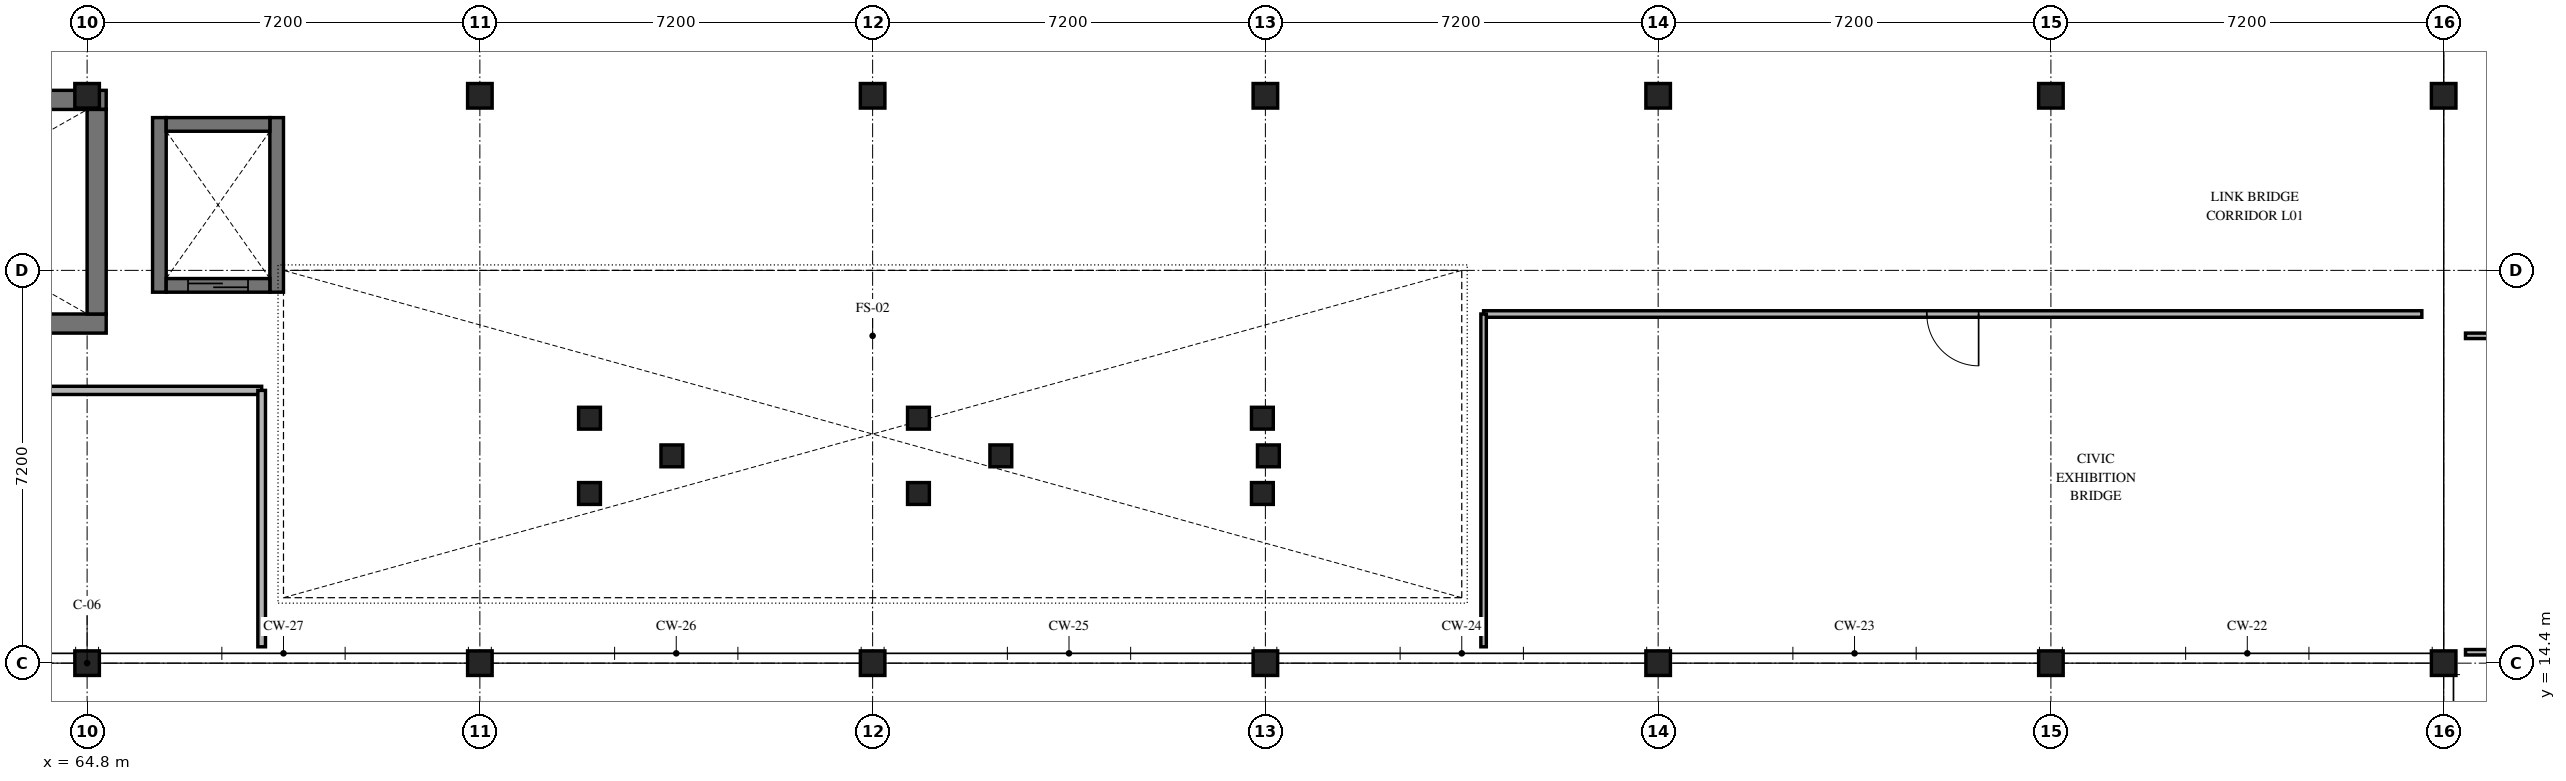
"""IFC4 building model, lengths in metres.
Left out: names, types, materials, properties, quantities, classifications, styles, units other than length and angle.
Written with IfcOpenShell. Run it as: python <this file> out.ifc"""

import sys

from ifc_helpers import new_model, si_unit, direction, frame, frame_2d, origin, origin_2d, place, context, subcontext, project, spatial, rectangle, extrude, element, fill, save


model = new_model("IFC4")
c1 = context("Model", 3, precision=1e-05, world=origin(), true_north=direction((0.0, 1.0)))
c2 = subcontext(c1, "Body", "Model", "MODEL_VIEW")
j1 = project(units=[si_unit("LENGTHUNIT", "METRE"), si_unit("PLANEANGLEUNIT", "RADIAN")], contexts=[c1])
p1 = place(None, origin())
s1 = spatial("IfcSite", under=j1, at=p1, CompositionType="ELEMENT")
p2 = place(p1, origin())
s2 = spatial("IfcBuilding", under=s1, at=p2, CompositionType="ELEMENT")
p3 = place(p2, frame((0.0, 0.0, 4.5)))
s3 = spatial("IfcBuildingStorey", under=s2, at=p3, CompositionType="ELEMENT", Elevation=4.5)
for number, where, z_axis, x_axis in (
    (1, (64.8, 14.4, 0.0), (0.0, 0.0, 1.0), (1.0, 0.0, 0.0)),
    (2, (64.8, 24.8, 0.0), (0.0, 0.0, 1.0), (1.0, 0.0, 0.0)),
    (3, (72.0, 14.4, 0.0), (0.0, 0.0, 1.0), (1.0, 0.0, 0.0)),
    (4, (72.0, 24.8, 0.0), (0.0, 0.0, 1.0), (1.0, 0.0, 0.0)),
    (5, (79.2, 14.4, 0.0), (0.0, 0.0, 1.0), (1.0, 0.0, 0.0)),
    (6, (79.2, 24.8, 0.0), (0.0, 0.0, 1.0), (1.0, 0.0, 0.0)),
    (7, (86.4, 14.4, 0.0), (0.0, 0.0, 1.0), (1.0, 0.0, 0.0)),
    (8, (86.4, 24.8, 0.0), (0.0, 0.0, 1.0), (1.0, 0.0, 0.0)),
    (9, (93.6, 14.4, 0.0), (0.0, 0.0, 1.0), (1.0, 0.0, 0.0)),
    (10, (93.6, 24.8, 0.0), (0.0, 0.0, 1.0), (1.0, 0.0, 0.0)),
    (11, (100.8, 14.4, 0.0), (0.0, 0.0, 1.0), (1.0, 0.0, 0.0)),
    (12, (100.8, 24.8, 0.0), (0.0, 0.0, 1.0), (1.0, 0.0, 0.0)),
    (13, (108.0, 14.4, 0.0), (0.0, 0.0, 1.0), (1.0, 0.0, 0.0)),
    (14, (108.0, 24.8, 0.0), (0.0, 0.0, 1.0), (1.0, 0.0, 0.0)),
):
    element("IfcColumn", number, at=place(p3, frame(where, z_axis=z_axis, x_axis=x_axis)), inside=s3, PredefinedType="COLUMN", context=c2, shape_type="SweptSolid", body=[
        extrude(rectangle(XDim=0.45, YDim=0.45, at=origin_2d()), origin(), (0.0, 0.0, 1.0), 4.2),
    ])
for number, where, z_axis, x_axis in (
    (15, (56.05, 20.625, 0.0), (0.0, 0.0, 1.0), (1.0, 0.0, 0.0)),
    (16, (65.15, 24.725, 0.0), (0.0, 0.0, 1.0), (-1.0, 0.0, 0.0)),
):
    element("IfcWall", number, at=place(p3, frame(where, z_axis=z_axis, x_axis=x_axis)), inside=s3, PredefinedType="SHEAR", context=c2, shape_type="SweptSolid", body=[
        extrude(rectangle(XDim=9.1, YDim=0.35, at=frame_2d((4.55, 0.0))), origin(), (0.0, 0.0, 1.0), 3.95),
    ])
p4 = place(p3, frame((64.975, 20.8, 0.0), z_axis=(0.0, 0.0, 1.0), x_axis=(0.0, 1.0, 0.0)))
e17 = element("IfcWall", 17, at=p4, inside=s3, PredefinedType="SHEAR", context=c2, shape_type="SweptSolid", body=[
    extrude(rectangle(XDim=3.75, YDim=0.35, at=frame_2d((1.875, 0.0))), origin(), (0.0, 0.0, 1.0), 3.95),
])
for number, where, z_axis, x_axis in (
    (18, (74.01, 17.51, 0.0), (0.0, 0.0, 1.0), (1.0, 0.0, 0.0)),
    (19, (74.01, 18.89, 0.0), (0.0, 0.0, 1.0), (1.0, 0.0, 0.0)),
    (20, (75.52, 18.2, 0.0), (0.0, 0.0, 1.0), (1.0, 0.0, 0.0)),
):
    element("IfcColumn", number, at=place(p3, frame(where, z_axis=z_axis, x_axis=x_axis)), inside=s3, PredefinedType="COLUMN", context=c2, shape_type="SweptSolid", body=[
        extrude(rectangle(XDim=0.4, YDim=0.4, at=origin_2d()), origin(), (0.0, 0.0, 1.0), 4.0),
    ])
for number, where, z_axis, x_axis in (
    (21, (80.04, 17.51, 0.0), (0.0, 0.0, 1.0), (1.0, 0.0, 0.0)),
    (22, (80.04, 18.89, 0.0), (0.0, 0.0, 1.0), (1.0, 0.0, 0.0)),
    (23, (81.55, 18.2, 0.0), (0.0, 0.0, 1.0), (1.0, 0.0, 0.0)),
    (24, (86.345, 17.51, 0.0), (0.0, 0.0, 1.0), (1.0, 0.0, 0.0)),
    (25, (86.345, 18.89, 0.0), (0.0, 0.0, 1.0), (1.0, 0.0, 0.0)),
    (26, (86.455, 18.2, 0.0), (0.0, 0.0, 1.0), (1.0, 0.0, 0.0)),
):
    element("IfcColumn", number, at=place(p3, frame(where, z_axis=z_axis, x_axis=x_axis)), inside=s3, PredefinedType="COLUMN", context=c2, shape_type="SweptSolid", body=[
        extrude(rectangle(XDim=0.4, YDim=0.4, at=origin_2d()), origin(), (0.0, 0.0, 1.0), 4.2),
    ])
for number, where, z_axis, x_axis in (
    (27, (66.125, 21.2, 0.0), (0.0, 0.0, 1.0), (0.0, 1.0, 0.0)),
    (28, (68.275, 24.4, 0.0), (0.0, 0.0, 1.0), (0.0, -1.0, 0.0)),
):
    element("IfcWall", number, at=place(p3, frame(where, z_axis=z_axis, x_axis=x_axis)), inside=s3, PredefinedType="SOLIDWALL", context=c2, shape_type="SweptSolid", body=[
        extrude(rectangle(XDim=3.2, YDim=0.25, at=frame_2d((1.6, 0.0))), origin(), (0.0, 0.0, 1.0), 3.95),
    ])
p5 = place(p3, frame((66.25, 21.325, 0.0), z_axis=(0.0, 0.0, 1.0), x_axis=(1.0, 0.0, 0.0)))
e29 = element("IfcWall", 29, at=p5, inside=s3, PredefinedType="SOLIDWALL", context=c2, shape_type="SweptSolid", body=[
    extrude(rectangle(XDim=1.9, YDim=0.25, at=frame_2d((0.95, 0.0))), origin(), (0.0, 0.0, 1.0), 3.95),
])
p6 = place(p5, frame((0.4, 0.0, 0.0)))
e30 = element("IfcOpeningElement", 30, at=p6, cuts=e29, PredefinedType="OPENING", context=c2, shape_type="SweptSolid", body=[
    extrude(rectangle(XDim=1.1, YDim=2.2, at=frame_2d((0.55, 1.1))), frame((0.0, 0.135, 0.0), z_axis=(0.0, -1.0, 0.0), x_axis=(1.0, 0.0, 0.0)), (0.0, 0.0, 1.0), 0.27),
])
p7 = place(p3, frame((68.15, 24.275, 0.0), z_axis=(0.0, 0.0, 1.0), x_axis=(-1.0, 0.0, 0.0)))
e31 = element("IfcWall", 31, at=p7, inside=s3, PredefinedType="SOLIDWALL", context=c2, shape_type="SweptSolid", body=[
    extrude(rectangle(XDim=1.9, YDim=0.25, at=frame_2d((0.95, 0.0))), origin(), (0.0, 0.0, 1.0), 3.95),
])
p8 = place(p3, frame((68.0, 19.4, 0.0), z_axis=(0.0, 0.0, 1.0), x_axis=(-1.0, 0.0, 0.0)))
e32 = element("IfcWall", 32, at=p8, inside=s3, PredefinedType="PARTITIONING", context=c2, shape_type="SweptSolid", body=[
    extrude(rectangle(XDim=17.2, YDim=0.15, at=frame_2d((8.6, 0.0))), origin(), (0.0, 0.0, 1.0), 3.95),
])
p9 = place(p8, frame((13.63, 0.0, 0.0)))
e33 = element("IfcOpeningElement", 33, at=p9, cuts=e32, PredefinedType="OPENING", context=c2, shape_type="SweptSolid", body=[
    extrude(rectangle(XDim=1.0, YDim=2.15, at=frame_2d((0.5, 1.075))), frame((0.0, 0.085, 0.0), z_axis=(0.0, -1.0, 0.0), x_axis=(1.0, 0.0, 0.0)), (0.0, 0.0, 1.0), 0.17),
])
p10 = place(p3, frame((68.0, 14.7, 0.0), z_axis=(0.0, 0.0, 1.0), x_axis=(0.0, 1.0, 0.0)))
e34 = element("IfcWall", 34, at=p10, inside=s3, PredefinedType="PARTITIONING", context=c2, shape_type="SweptSolid", body=[
    extrude(rectangle(XDim=4.7, YDim=0.14, at=frame_2d((2.35, 0.0))), origin(), (0.0, 0.0, 1.0), 3.95),
])
p11 = place(p3, frame((107.6, 20.8, 0.0), z_axis=(0.0, 0.0, 1.0), x_axis=(-1.0, 0.0, 0.0)))
e35 = element("IfcWall", 35, at=p11, inside=s3, PredefinedType="PARTITIONING", context=c2, shape_type="SweptSolid", body=[
    extrude(rectangle(XDim=17.2, YDim=0.12, at=frame_2d((8.6, 0.0))), origin(), (0.0, 0.0, 1.0), 3.2),
])
p12 = place(p11, frame((8.125, 0.0, 0.0)))
e36 = element("IfcOpeningElement", 36, at=p12, cuts=e35, PredefinedType="OPENING", context=c2, shape_type="SweptSolid", body=[
    extrude(rectangle(XDim=0.95, YDim=2.15, at=frame_2d((0.475, 1.075))), frame((0.0, 0.07, 0.0), z_axis=(0.0, -1.0, 0.0), x_axis=(1.0, 0.0, 0.0)), (0.0, 0.0, 1.0), 0.14),
])
p13 = place(p3, frame((90.4, 20.8, 0.0), z_axis=(0.0, 0.0, 1.0), x_axis=(0.0, -1.0, 0.0)))
e37 = element("IfcWall", 37, at=p13, inside=s3, PredefinedType="PARTITIONING", context=c2, shape_type="SweptSolid", body=[
    extrude(rectangle(XDim=6.1, YDim=0.1, at=frame_2d((3.05, 0.0))), origin(), (0.0, 0.0, 1.0), 3.95),
])
p14 = place(p3, frame((114.91, 14.6, 0.0), z_axis=(0.0, 0.0, 1.0), x_axis=(-1.0, 0.0, 0.0)))
e38 = element("IfcWall", 38, at=p14, inside=s3, PredefinedType="PARTITIONING", context=c2, shape_type="SweptSolid", body=[
    extrude(rectangle(XDim=6.51, YDim=0.1, at=frame_2d((3.255, 0.0))), origin(), (0.0, 0.0, 1.0), 3.95),
])
p15 = place(p3, frame((108.4, 20.4, 0.0), z_axis=(0.0, 0.0, 1.0), x_axis=(1.0, 0.0, 0.0)))
e39 = element("IfcWall", 39, at=p15, inside=s3, PredefinedType="PARTITIONING", context=c2, shape_type="SweptSolid", body=[
    extrude(rectangle(XDim=8.6, YDim=0.1, at=frame_2d((4.3, 0.0))), origin(), (0.0, 0.0, 1.0), 3.15),
])
p16 = place(p15, frame((3.65, 0.0, 0.0)))
e40 = element("IfcOpeningElement", 40, at=p16, cuts=e39, PredefinedType="OPENING", context=c2, shape_type="SweptSolid", body=[
    extrude(rectangle(XDim=1.3, YDim=2.2, at=frame_2d((0.65, 1.1))), frame((0.0, 0.06, 0.0), z_axis=(0.0, -1.0, 0.0), x_axis=(1.0, 0.0, 0.0)), (0.0, 0.0, 1.0), 0.12),
])
p17 = place(p6, origin())
e41 = element("IfcDoor", 41, at=p17, inside=s3, OperationType="DOUBLE_DOOR_SLIDING", PredefinedType="DOOR", context=c2, shape_type="SweptSolid", body=[
    extrude(rectangle(XDim=1.1, YDim=2.2, at=frame_2d((0.55, 1.1))), frame((0.0, 0.025, 0.0), z_axis=(0.0, -1.0, 0.0), x_axis=(1.0, 0.0, 0.0)), (0.0, 0.0, 1.0), 0.05),
])
fill(e30, e41)
p18 = place(p12, origin())
e42 = element("IfcDoor", 42, at=p18, inside=s3, OperationType="SINGLE_SWING_LEFT", PredefinedType="DOOR", context=c2, shape_type="SweptSolid", body=[
    extrude(rectangle(XDim=0.95, YDim=2.15, at=frame_2d((0.475, 1.075))), frame((0.0, 0.025, 0.0), z_axis=(0.0, -1.0, 0.0), x_axis=(1.0, 0.0, 0.0)), (0.0, 0.0, 1.0), 0.05),
])
fill(e36, e42)
save(model, sys.argv[1])
